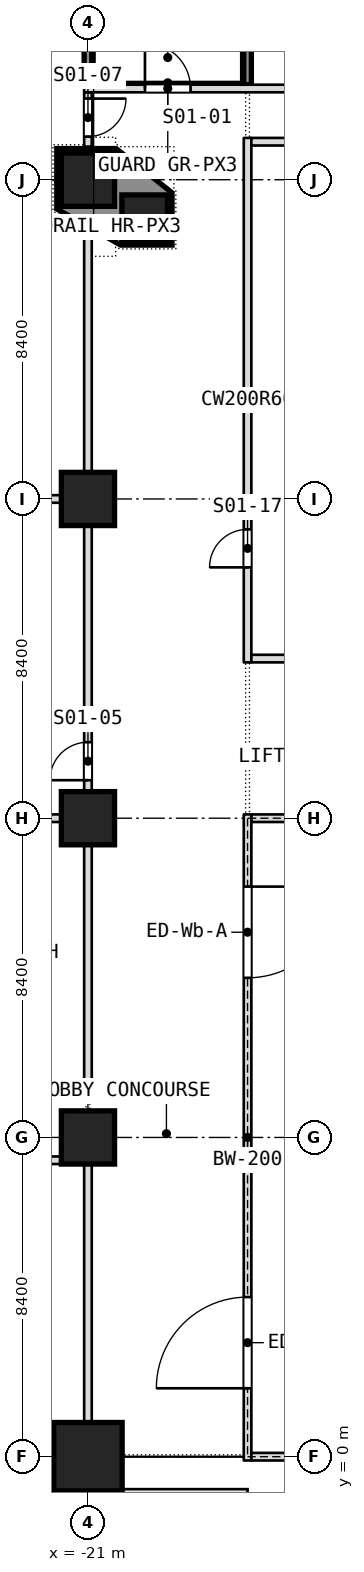
"""IFC4 building model, lengths in metres.
Left out: names, types, materials, properties, quantities, classifications, styles, units other than length and angle.
Written with IfcOpenShell. Run it as: python <this file> out.ifc"""

import sys

from ifc_helpers import new_model, si_unit, direction, frame, frame_2d, origin, origin_2d, place, context, subcontext, project, spatial, polyline, rectangle, outline, extrude, element, fill, save


model = new_model("IFC4")
c1 = context("Model", 3, precision=1e-05, world=origin(), true_north=direction((0.0, 1.0)))
c2 = subcontext(c1, "Body", "Model", "MODEL_VIEW")
j1 = project(units=[si_unit("LENGTHUNIT", "METRE"), si_unit("PLANEANGLEUNIT", "RADIAN")], contexts=[c1])
p1 = place(None, origin())
s1 = spatial("IfcSite", under=j1, at=p1, CompositionType="ELEMENT")
p2 = place(p1, origin())
s2 = spatial("IfcBuilding", under=s1, at=p2, CompositionType="ELEMENT")
p3 = place(p2, origin())
s3 = spatial("IfcBuildingStorey", under=s2, at=p3, CompositionType="ELEMENT", Elevation=0.0)
p4 = place(p3, frame((-21.0, 0.0, -0.3), z_axis=(0.0, 0.0, 1.0), x_axis=(1.0, 0.0, 0.0)))
e1 = element("IfcColumn", 1, at=p4, inside=s3, PredefinedType="COLUMN", context=c2, shape_type="SweptSolid", body=[
    extrude(rectangle(XDim=1.8, YDim=1.8, at=origin_2d()), origin(), (0.0, 0.0, 1.0), 8.3),
])
for number, where, z_axis, x_axis in (
    (2, (-21.0, 8.4, -0.3), (0.0, 0.0, 1.0), (1.0, 0.0, 0.0)),
    (3, (-21.0, 16.8, -0.3), (0.0, 0.0, 1.0), (1.0, 0.0, 0.0)),
    (4, (-21.0, 25.2, -0.3), (0.0, 0.0, 1.0), (1.0, 0.0, 0.0)),
    (5, (-21.0, 33.6, -0.3), (0.0, 0.0, 1.0), (1.0, 0.0, 0.0)),
):
    element("IfcColumn", number, at=place(p3, frame(where, z_axis=z_axis, x_axis=x_axis)), inside=s3, PredefinedType="COLUMN", context=c2, shape_type="SweptSolid", body=[
        extrude(rectangle(XDim=1.4, YDim=1.4, at=origin_2d()), origin(), (0.0, 0.0, 1.0), 8.3),
    ])
p5 = place(p3, frame((-19.507, 32.6, -0.3), z_axis=(0.0, 0.0, 1.0), x_axis=(1.0, 0.0, 0.0)))
e6 = element("IfcColumn", 6, at=p5, inside=s3, PredefinedType="COLUMN", context=c2, shape_type="SweptSolid", body=[
    extrude(rectangle(XDim=1.2, YDim=1.2, at=origin_2d()), origin(), (0.0, 0.0, 1.0), 8.3),
])
p6 = place(p3, frame((-38.1, 7.8, 0.0), z_axis=(0.0, 0.0, 1.0), x_axis=(1.0, 0.0, 0.0)))
e7 = element("IfcWall", 7, at=p6, inside=s3, PredefinedType="PARTITIONING", context=c2, shape_type="SweptSolid", body=[
    extrude(rectangle(XDim=17.0, YDim=0.2, at=frame_2d((8.5, 0.0))), origin(), (0.0, 0.0, 1.0), 7.68),
])
p7 = place(p6, frame((6.5, 0.0, 0.0)))
e8 = element("IfcOpeningElement", 8, at=p7, cuts=e7, PredefinedType="OPENING", context=c2, shape_type="SweptSolid", body=[
    extrude(rectangle(XDim=1.8, YDim=2.1, at=frame_2d((0.9, 1.05))), frame((0.0, 0.1, 0.0), z_axis=(0.0, -1.0, 0.0), x_axis=(1.0, 0.0, 0.0)), (0.0, 0.0, 1.0), 0.2),
])
p8 = place(p3, frame((-27.3, 9.6, 0.0), z_axis=(0.0, 0.0, 1.0), x_axis=(1.0, 0.0, 0.0)))
e9 = element("IfcWall", 9, at=p8, inside=s3, PredefinedType="PARTITIONING", context=c2, shape_type="SweptSolid", body=[
    extrude(rectangle(XDim=6.2, YDim=0.2, at=frame_2d((3.1, 0.0))), origin(), (0.0, 0.0, 1.0), 7.68),
])
p9 = place(p3, frame((-16.8, 20.9, 0.0), z_axis=(0.0, 0.0, 1.0), x_axis=(0.0, 1.0, 0.0)))
e10 = element("IfcWall", 10, at=p9, inside=s3, PredefinedType="PARTITIONING", context=c2, shape_type="SweptSolid", body=[
    extrude(rectangle(XDim=13.8, YDim=0.2, at=frame_2d((6.9, 0.0))), origin(), (0.0, 0.0, 1.0), 7.68),
])
p10 = place(p9, frame((2.5, 0.0, 0.0)))
e11 = element("IfcOpeningElement", 11, at=p10, cuts=e10, PredefinedType="OPENING", context=c2, shape_type="SweptSolid", body=[
    extrude(rectangle(XDim=1.0, YDim=2.1, at=frame_2d((0.5, 1.05))), frame((0.0, 0.1, 0.0), z_axis=(0.0, -1.0, 0.0), x_axis=(1.0, 0.0, 0.0)), (0.0, 0.0, 1.0), 0.2),
])
p11 = place(p3, frame((-16.8, 36.1, 0.0), z_axis=(0.0, 0.0, 1.0), x_axis=(0.0, 1.0, 0.0)))
e12 = element("IfcWall", 12, at=p11, inside=s3, PredefinedType="PARTITIONING", context=c2, shape_type="SweptSolid", body=[
    extrude(rectangle(XDim=5.9, YDim=0.2, at=frame_2d((2.95, 0.0))), origin(), (0.0, 0.0, 1.0), 7.68),
])
p12 = place(p3, frame((-27.63, 16.8, 0.0), z_axis=(0.0, 0.0, 1.0), x_axis=(1.0, 0.0, 0.0)))
e13 = element("IfcWall", 13, at=p12, inside=s3, PredefinedType="PARTITIONING", context=c2, shape_type="SweptSolid", body=[
    extrude(rectangle(XDim=6.53, YDim=0.2, at=frame_2d((3.265, 0.0))), origin(), (0.0, 0.0, 1.0), 7.68),
])
p13 = place(p3, frame((-21.0, -0.894, 0.0), z_axis=(0.0, 0.0, 1.0), x_axis=(0.0, 1.0, 0.0)))
e14 = element("IfcWall", 14, at=p13, inside=s3, PredefinedType="PARTITIONING", context=c2, shape_type="SweptSolid", body=[
    extrude(rectangle(XDim=8.794, YDim=0.2, at=frame_2d((4.397, 0.0))), origin(), (0.0, 0.0, 1.0), 7.68),
])
p14 = place(p3, frame((-21.0, 9.5, 0.0), z_axis=(0.0, 0.0, 1.0), x_axis=(0.0, 1.0, 0.0)))
e15 = element("IfcWall", 15, at=p14, inside=s3, PredefinedType="PARTITIONING", context=c2, shape_type="SweptSolid", body=[
    extrude(rectangle(XDim=22.788, YDim=0.2, at=frame_2d((11.394, 0.0))), origin(), (0.0, 0.0, 1.0), 7.68),
])
p15 = place(p14, frame((8.3, 0.0, 0.0)))
e16 = element("IfcOpeningElement", 16, at=p15, cuts=e15, PredefinedType="OPENING", context=c2, shape_type="SweptSolid", body=[
    extrude(rectangle(XDim=1.0, YDim=2.1, at=frame_2d((0.5, 1.05))), frame((0.0, 0.1, 0.0), z_axis=(0.0, -1.0, 0.0), x_axis=(1.0, 0.0, 0.0)), (0.0, 0.0, 1.0), 0.2),
])
p16 = place(p3, frame((-21.0, 34.47, 0.0), z_axis=(0.0, 0.0, 1.0), x_axis=(0.0, 1.0, 0.0)))
e17 = element("IfcWall", 17, at=p16, inside=s3, PredefinedType="PARTITIONING", context=c2, shape_type="SweptSolid", body=[
    extrude(rectangle(XDim=1.43, YDim=0.2, at=frame_2d((0.715, 0.0))), origin(), (0.0, 0.0, 1.0), 7.68),
])
p17 = place(p16, frame((0.265, 0.0, 0.0)))
e18 = element("IfcOpeningElement", 18, at=p17, cuts=e17, PredefinedType="OPENING", context=c2, shape_type="SweptSolid", body=[
    extrude(rectangle(XDim=1.0, YDim=2.1, at=frame_2d((0.5, 1.05))), frame((0.0, 0.1, 0.0), z_axis=(0.0, -1.0, 0.0), x_axis=(1.0, 0.0, 0.0)), (0.0, 0.0, 1.0), 0.2),
])
p18 = place(p3, frame((-21.0, 36.1, 0.0), z_axis=(0.0, 0.0, 1.0), x_axis=(0.0, 1.0, 0.0)))
e19 = element("IfcWall", 19, at=p18, inside=s3, PredefinedType="PARTITIONING", context=c2, shape_type="SweptSolid", body=[
    extrude(rectangle(XDim=6.2, YDim=0.2, at=frame_2d((3.1, 0.0))), origin(), (0.0, 0.0, 1.0), 7.68),
])
p19 = place(p3, frame((-16.7, 21.0, 0.0), z_axis=(0.0, 0.0, 1.0), x_axis=(1.0, 0.0, 0.0)))
e20 = element("IfcWall", 20, at=p19, inside=s3, PredefinedType="PARTITIONING", context=c2, shape_type="SweptSolid", body=[
    extrude(rectangle(XDim=33.4, YDim=0.2, at=frame_2d((16.7, 0.0))), origin(), (0.0, 0.0, 1.0), 7.68),
])
p20 = place(p19, frame((15.825, 0.0, 0.0)))
e21 = element("IfcOpeningElement", 21, at=p20, cuts=e20, PredefinedType="OPENING", context=c2, shape_type="SweptSolid", body=[
    extrude(rectangle(XDim=1.8, YDim=2.1, at=frame_2d((0.9, 1.05))), frame((0.0, 0.1, 0.0), z_axis=(0.0, -1.0, 0.0), x_axis=(1.0, 0.0, 0.0)), (0.0, 0.0, 1.0), 0.2),
])
p21 = place(p19, frame((7.375, 0.0, 0.0)))
e22 = element("IfcOpeningElement", 22, at=p21, cuts=e20, PredefinedType="OPENING", context=c2, shape_type="SweptSolid", body=[
    extrude(rectangle(XDim=1.8, YDim=2.1, at=frame_2d((0.9, 1.05))), frame((0.0, 0.1, 0.0), z_axis=(0.0, -1.0, 0.0), x_axis=(1.0, 0.0, 0.0)), (0.0, 0.0, 1.0), 0.2),
])
p22 = place(p19, frame((24.175, 0.0, 0.0)))
e23 = element("IfcOpeningElement", 23, at=p22, cuts=e20, PredefinedType="OPENING", context=c2, shape_type="SweptSolid", body=[
    extrude(rectangle(XDim=1.8, YDim=2.1, at=frame_2d((0.9, 1.05))), frame((0.0, 0.1, 0.0), z_axis=(0.0, -1.0, 0.0), x_axis=(1.0, 0.0, 0.0)), (0.0, 0.0, 1.0), 0.2),
])
p23 = place(p19, frame((30.425, 0.0, 0.0)))
e24 = element("IfcOpeningElement", 24, at=p23, cuts=e20, PredefinedType="OPENING", context=c2, shape_type="SweptSolid", body=[
    extrude(rectangle(XDim=1.8, YDim=2.1, at=frame_2d((0.9, 1.05))), frame((0.0, 0.1, 0.0), z_axis=(0.0, -1.0, 0.0), x_axis=(1.0, 0.0, 0.0)), (0.0, 0.0, 1.0), 0.2),
])
p24 = place(p3, frame((-27.837, 25.2, 0.0), z_axis=(0.0, 0.0, 1.0), x_axis=(1.0, 0.0, 0.0)))
e25 = element("IfcWall", 25, at=p24, inside=s3, PredefinedType="PARTITIONING", context=c2, shape_type="SweptSolid", body=[
    extrude(rectangle(XDim=6.737, YDim=0.2, at=frame_2d((3.368, 0.0))), origin(), (0.0, 0.0, 1.0), 7.68),
])
p25 = place(p3, frame((-16.7, 34.6, 0.0), z_axis=(0.0, 0.0, 1.0), x_axis=(1.0, 0.0, 0.0)))
e26 = element("IfcWall", 26, at=p25, inside=s3, PredefinedType="PARTITIONING", context=c2, shape_type="SweptSolid", body=[
    extrude(rectangle(XDim=3.23, YDim=0.2, at=frame_2d((1.615, 0.0))), origin(), (0.0, 0.0, 1.0), 7.68),
])
p26 = place(p3, frame((-21.1, 36.0, 0.0), z_axis=(0.0, 0.0, 1.0), x_axis=(1.0, 0.0, 0.0)))
e27 = element("IfcWall", 27, at=p26, inside=s3, PredefinedType="PARTITIONING", context=c2, shape_type="SweptSolid", body=[
    extrude(rectangle(XDim=23.3, YDim=0.2, at=frame_2d((11.65, 0.0))), origin(), (0.0, 0.0, 1.0), 7.68),
])
p27 = place(p26, frame((1.6, 0.0, 0.0)))
e28 = element("IfcOpeningElement", 28, at=p27, cuts=e27, PredefinedType="OPENING", context=c2, shape_type="SweptSolid", body=[
    extrude(rectangle(XDim=1.2, YDim=2.1, at=frame_2d((0.6, 1.05))), frame((0.0, 0.1, 0.0), z_axis=(0.0, -1.0, 0.0), x_axis=(1.0, 0.0, 0.0)), (0.0, 0.0, 1.0), 0.2),
])
p28 = place(p26, frame((6.0, 0.0, 0.0)))
e29 = element("IfcOpeningElement", 29, at=p28, cuts=e27, PredefinedType="OPENING", context=c2, shape_type="SweptSolid", body=[
    extrude(rectangle(XDim=1.0, YDim=2.1, at=frame_2d((0.5, 1.05))), frame((0.0, 0.1, 0.0), z_axis=(0.0, -1.0, 0.0), x_axis=(1.0, 0.0, 0.0)), (0.0, 0.0, 1.0), 0.2),
])
p29 = place(p26, frame((13.15, 0.0, 0.0)))
e30 = element("IfcOpeningElement", 30, at=p29, cuts=e27, PredefinedType="OPENING", context=c2, shape_type="SweptSolid", body=[
    extrude(rectangle(XDim=1.0, YDim=2.1, at=frame_2d((0.5, 1.05))), frame((0.0, 0.1, 0.0), z_axis=(0.0, -1.0, 0.0), x_axis=(1.0, 0.0, 0.0)), (0.0, 0.0, 1.0), 0.2),
])
p30 = place(p26, frame((20.5, 0.0, 0.0)))
e31 = element("IfcOpeningElement", 31, at=p30, cuts=e27, PredefinedType="OPENING", context=c2, shape_type="SweptSolid", body=[
    extrude(rectangle(XDim=1.2, YDim=2.1, at=frame_2d((0.6, 1.05))), frame((0.0, 0.1, 0.0), z_axis=(0.0, -1.0, 0.0), x_axis=(1.0, 0.0, 0.0)), (0.0, 0.0, 1.0), 0.2),
])
p31 = place(p3, frame((-16.8, -0.1, 0.0), z_axis=(0.0, 0.0, 1.0), x_axis=(0.0, 1.0, 0.0)))
e32 = element("IfcWall", 32, at=p31, inside=s3, PredefinedType="PARTITIONING", context=c2, shape_type="SweptSolid", body=[
    extrude(rectangle(XDim=17.0, YDim=0.2, at=frame_2d((8.5, 0.0))), origin(), (0.0, 0.0, 1.0), 7.78),
])
p32 = place(p31, frame((1.9, 0.0, 0.0)))
e33 = element("IfcOpeningElement", 33, at=p32, cuts=e32, PredefinedType="OPENING", context=c2, shape_type="SweptSolid", body=[
    extrude(rectangle(XDim=2.4, YDim=2.1, at=frame_2d((1.2, 1.05))), frame((0.0, 0.1, 0.0), z_axis=(0.0, -1.0, 0.0), x_axis=(1.0, 0.0, 0.0)), (0.0, 0.0, 1.0), 0.2),
])
p33 = place(p31, frame((12.7, 0.0, 0.0)))
e34 = element("IfcOpeningElement", 34, at=p33, cuts=e32, PredefinedType="OPENING", context=c2, shape_type="SweptSolid", body=[
    extrude(rectangle(XDim=2.4, YDim=2.1, at=frame_2d((1.2, 1.05))), frame((0.0, 0.1, 0.0), z_axis=(0.0, -1.0, 0.0), x_axis=(1.0, 0.0, 0.0)), (0.0, 0.0, 1.0), 0.2),
])
p34 = place(p3, frame((-16.7, 0.0, 0.0), z_axis=(0.0, 0.0, 1.0), x_axis=(1.0, 0.0, 0.0)))
e35 = element("IfcWall", 35, at=p34, inside=s3, PredefinedType="PARTITIONING", context=c2, shape_type="SweptSolid", body=[
    extrude(rectangle(XDim=4.1, YDim=0.2, at=frame_2d((2.05, 0.0))), origin(), (0.0, 0.0, 1.0), 7.78),
])
p35 = place(p34, frame((1.1, 0.0, 0.0)))
e36 = element("IfcOpeningElement", 36, at=p35, cuts=e35, PredefinedType="OPENING", context=c2, shape_type="SweptSolid", body=[
    extrude(rectangle(XDim=1.8, YDim=2.1, at=frame_2d((0.9, 1.05))), frame((0.0, 0.1, 0.0), z_axis=(0.0, -1.0, 0.0), x_axis=(1.0, 0.0, 0.0)), (0.0, 0.0, 1.0), 0.2),
])
p36 = place(p3, frame((-16.7, 16.8, 0.0), z_axis=(0.0, 0.0, 1.0), x_axis=(1.0, 0.0, 0.0)))
e37 = element("IfcWall", 37, at=p36, inside=s3, PredefinedType="PARTITIONING", context=c2, shape_type="SweptSolid", body=[
    extrude(rectangle(XDim=4.1, YDim=0.2, at=frame_2d((2.05, 0.0))), origin(), (0.0, 0.0, 1.0), 7.78),
])
p37 = place(p3, origin())
e38 = element("IfcWall", 38, at=p37, inside=s3, PredefinedType="SOLIDWALL", context=c2, shape_type="SweptSolid", body=[
    extrude(outline(polyline([(-21.82, 34.42), (-20.258, 34.42), (-18.787, 33.258), (-18.787, 31.88), (-20.138, 31.88), (-21.82, 32.83), (-21.82, 34.42)]), holes=[polyline([(-18.907, 32.0), (-18.907, 33.2), (-20.107, 33.2), (-20.107, 32.0), (-18.907, 32.0)]), polyline([(-20.3, 32.9), (-20.3, 34.3), (-21.7, 34.3), (-21.7, 32.9), (-20.3, 32.9)])]), origin(), (0.0, 0.0, 1.0), 8.0),
])
p38 = place(p10, origin())
e39 = element("IfcDoor", 39, at=p38, inside=s3, OperationType="SINGLE_SWING_LEFT", PredefinedType="DOOR", context=c2, shape_type="SweptSolid", body=[
    extrude(rectangle(XDim=1.0, YDim=2.1, at=frame_2d((0.5, 1.05))), frame((0.0, 0.025, 0.0), z_axis=(0.0, -1.0, 0.0), x_axis=(1.0, 0.0, 0.0)), (0.0, 0.0, 1.0), 0.05),
])
fill(e11, e39)
p39 = place(p15, origin())
e40 = element("IfcDoor", 40, at=p39, inside=s3, OperationType="SINGLE_SWING_RIGHT", PredefinedType="DOOR", context=c2, shape_type="SweptSolid", body=[
    extrude(rectangle(XDim=1.0, YDim=2.1, at=frame_2d((0.5, 1.05))), frame((0.0, 0.025, 0.0), z_axis=(0.0, -1.0, 0.0), x_axis=(1.0, 0.0, 0.0)), (0.0, 0.0, 1.0), 0.05),
])
fill(e16, e40)
p40 = place(p17, origin())
e41 = element("IfcDoor", 41, at=p40, inside=s3, OperationType="SINGLE_SWING_LEFT", PredefinedType="DOOR", context=c2, shape_type="SweptSolid", body=[
    extrude(rectangle(XDim=1.0, YDim=2.1, at=frame_2d((0.5, 1.05))), frame((0.0, 0.025, 0.0), z_axis=(0.0, -1.0, 0.0), x_axis=(1.0, 0.0, 0.0)), (0.0, 0.0, 1.0), 0.05),
])
fill(e18, e41)
p41 = place(p27, origin())
e42 = element("IfcDoor", 42, at=p41, inside=s3, OperationType="SINGLE_SWING_RIGHT", PredefinedType="DOOR", context=c2, shape_type="SweptSolid", body=[
    extrude(rectangle(XDim=1.2, YDim=2.1, at=frame_2d((0.6, 1.05))), frame((0.0, 0.025, 0.0), z_axis=(0.0, -1.0, 0.0), x_axis=(1.0, 0.0, 0.0)), (0.0, 0.0, 1.0), 0.05),
])
fill(e28, e42)
p42 = place(p32, origin())
e43 = element("IfcDoor", 43, at=p42, inside=s3, OperationType="DOUBLE_DOOR_SINGLE_SWING", PredefinedType="DOOR", context=c2, shape_type="SweptSolid", body=[
    extrude(rectangle(XDim=2.4, YDim=2.1, at=frame_2d((1.2, 1.05))), frame((0.0, 0.025, 0.0), z_axis=(0.0, -1.0, 0.0), x_axis=(1.0, 0.0, 0.0)), (0.0, 0.0, 1.0), 0.05),
])
fill(e33, e43)
p43 = place(p33, origin())
e44 = element("IfcDoor", 44, at=p43, inside=s3, OperationType="DOUBLE_DOOR_SINGLE_SWING", PredefinedType="DOOR", context=c2, shape_type="SweptSolid", body=[
    extrude(rectangle(XDim=2.4, YDim=2.1, at=frame_2d((1.2, 1.05))), frame((0.0, 0.025, 0.0), z_axis=(0.0, -1.0, 0.0), x_axis=(1.0, 0.0, 0.0)), (0.0, 0.0, 1.0), 0.05),
])
fill(e34, e44)
save(model, sys.argv[1])
